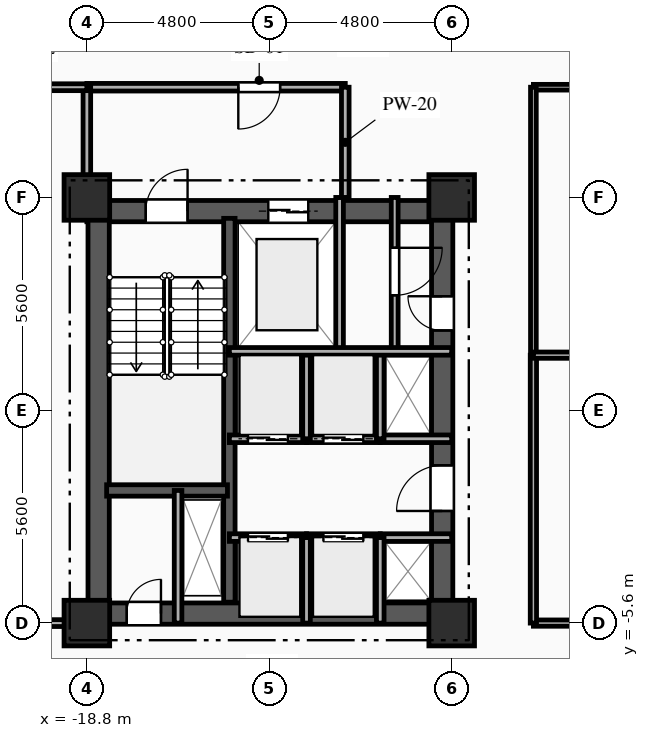
"""IFC4 building model, lengths in metres.
Left out: names, types, materials, properties, quantities, classifications, styles, units other than length and angle.
Written with IfcOpenShell. Run it as: python <this file> out.ifc"""

import sys

from ifc_helpers import new_model, si_unit, direction, frame, frame_2d, origin, origin_2d, place, context, subcontext, project, spatial, rectangle, extrude, element, fill, save


model = new_model("IFC4")
c1 = context("Model", 3, precision=1e-05, world=origin(), true_north=direction((0.0, 1.0)))
c2 = subcontext(c1, "Body", "Model", "MODEL_VIEW")
j1 = project(units=[si_unit("LENGTHUNIT", "METRE"), si_unit("PLANEANGLEUNIT", "RADIAN")], contexts=[c1])
p1 = place(None, origin())
s1 = spatial("IfcSite", under=j1, at=p1, CompositionType="ELEMENT")
p2 = place(p1, origin())
s2 = spatial("IfcBuilding", under=s1, at=p2, CompositionType="ELEMENT")
p3 = place(p2, frame((0.0, 0.0, 47.1)))
s3 = spatial("IfcBuildingStorey", under=s2, at=p3, CompositionType="ELEMENT", Elevation=47.1)
for number, where, z_axis, x_axis in (
    (1, (-18.8, -5.6, 0.0), (0.0, 0.0, 1.0), (1.0, 0.0, 0.0)),
    (2, (-18.8, 5.6, 0.0), (0.0, 0.0, 1.0), (1.0, 0.0, 0.0)),
    (3, (-9.2, -5.6, 0.0), (0.0, 0.0, 1.0), (1.0, 0.0, 0.0)),
    (4, (-9.2, 5.6, 0.0), (0.0, 0.0, 1.0), (1.0, 0.0, 0.0)),
):
    element("IfcColumn", number, at=place(p3, frame(where, z_axis=z_axis, x_axis=x_axis)), inside=s3, PredefinedType="COLUMN", context=c2, shape_type="SweptSolid", body=[
        extrude(rectangle(XDim=1.2, YDim=1.2, at=origin_2d()), origin(), (0.0, 0.0, 1.0), 3.35),
    ])
p4 = place(p3, frame((-18.8, 5.24, 0.0), z_axis=(0.0, 0.0, 1.0), x_axis=(1.0, 0.0, 0.0)))
e5 = element("IfcWall", 5, at=p4, inside=s3, PredefinedType="SHEAR", context=c2, shape_type="SweptSolid", body=[
    extrude(rectangle(XDim=9.6, YDim=0.56, at=frame_2d((4.8, 0.0))), origin(), (0.0, 0.0, 1.0), 3.035),
])
p5 = place(p4, frame((1.55, 0.0, 0.0)))
e6 = element("IfcOpeningElement", 6, at=p5, cuts=e5, PredefinedType="OPENING", context=c2, shape_type="SweptSolid", body=[
    extrude(rectangle(XDim=1.1, YDim=2.15, at=frame_2d((0.55, 1.075))), frame((0.0, 0.29, 0.0), z_axis=(0.0, -1.0, 0.0), x_axis=(1.0, 0.0, 0.0)), (0.0, 0.0, 1.0), 0.58),
])
p6 = place(p4, frame((4.775, 0.0, 0.0)))
e7 = element("IfcOpeningElement", 7, at=p6, cuts=e5, PredefinedType="OPENING", context=c2, shape_type="SweptSolid", body=[
    extrude(rectangle(XDim=1.05, YDim=2.1, at=frame_2d((0.525, 1.05))), frame((0.0, 0.29, 0.0), z_axis=(0.0, -1.0, 0.0), x_axis=(1.0, 0.0, 0.0)), (0.0, 0.0, 1.0), 0.58),
])
p7 = place(p3, frame((-18.8, -5.35, 0.0), z_axis=(0.0, 0.0, 1.0), x_axis=(1.0, 0.0, 0.0)))
e8 = element("IfcWall", 8, at=p7, inside=s3, PredefinedType="SHEAR", context=c2, shape_type="SweptSolid", body=[
    extrude(rectangle(XDim=9.6, YDim=0.56, at=frame_2d((4.8, 0.0))), origin(), (0.0, 0.0, 1.0), 3.035),
])
p8 = place(p7, frame((1.05, 0.0, 0.0)))
e9 = element("IfcOpeningElement", 9, at=p8, cuts=e8, PredefinedType="OPENING", context=c2, shape_type="SweptSolid", body=[
    extrude(rectangle(XDim=0.9, YDim=2.1, at=frame_2d((0.45, 1.05))), frame((0.0, 0.29, 0.0), z_axis=(0.0, -1.0, 0.0), x_axis=(1.0, 0.0, 0.0)), (0.0, 0.0, 1.0), 0.58),
])
p9 = place(p3, frame((-18.49, -5.05, 0.0), z_axis=(0.0, 0.0, 1.0), x_axis=(0.0, 1.0, 0.0)))
e10 = element("IfcWall", 10, at=p9, inside=s3, PredefinedType="SHEAR", context=c2, shape_type="SweptSolid", body=[
    extrude(rectangle(XDim=10.1, YDim=0.56, at=frame_2d((5.05, 0.0))), origin(), (0.0, 0.0, 1.0), 3.035),
])
p10 = place(p3, frame((-9.45, -5.05, 0.0), z_axis=(0.0, 0.0, 1.0), x_axis=(0.0, 1.0, 0.0)))
e11 = element("IfcWall", 11, at=p10, inside=s3, PredefinedType="SHEAR", context=c2, shape_type="SweptSolid", body=[
    extrude(rectangle(XDim=10.1, YDim=0.56, at=frame_2d((5.05, 0.0))), origin(), (0.0, 0.0, 1.0), 3.035),
])
p11 = place(p10, frame((7.15, 0.0, 0.0)))
e12 = element("IfcOpeningElement", 12, at=p11, cuts=e11, PredefinedType="OPENING", context=c2, shape_type="SweptSolid", body=[
    extrude(rectangle(XDim=0.9, YDim=2.1, at=frame_2d((0.45, 1.05))), frame((0.0, 0.29, 0.0), z_axis=(0.0, -1.0, 0.0), x_axis=(1.0, 0.0, 0.0)), (0.0, 0.0, 1.0), 0.58),
])
p12 = place(p10, frame((2.4, 0.0, 0.0)))
e13 = element("IfcOpeningElement", 13, at=p12, cuts=e11, PredefinedType="OPENING", context=c2, shape_type="SweptSolid", body=[
    extrude(rectangle(XDim=1.2, YDim=2.15, at=frame_2d((0.6, 1.075))), frame((0.0, 0.29, 0.0), z_axis=(0.0, -1.0, 0.0), x_axis=(1.0, 0.0, 0.0)), (0.0, 0.0, 1.0), 0.58),
])
p13 = place(p3, frame((-15.05, -5.05, 0.0), z_axis=(0.0, 0.0, 1.0), x_axis=(0.0, 1.0, 0.0)))
e14 = element("IfcWall", 14, at=p13, inside=s3, PredefinedType="SHEAR", context=c2, shape_type="SweptSolid", body=[
    extrude(rectangle(XDim=10.1, YDim=0.3, at=frame_2d((5.05, 0.0))), origin(), (0.0, 0.0, 1.0), 3.035),
])
p14 = place(p3, frame((-18.28, -2.11, 0.0), z_axis=(0.0, 0.0, 1.0), x_axis=(1.0, 0.0, 0.0)))
e15 = element("IfcWall", 15, at=p14, inside=s3, PredefinedType="SHEAR", context=c2, shape_type="SweptSolid", body=[
    extrude(rectangle(XDim=3.18, YDim=0.3, at=frame_2d((1.59, 0.0))), origin(), (0.0, 0.0, 1.0), 3.035),
])
p15 = place(p3, frame((-16.4, -5.6, 0.0), z_axis=(0.0, 0.0, 1.0), x_axis=(0.0, 1.0, 0.0)))
e16 = element("IfcWall", 16, at=p15, inside=s3, PredefinedType="PARTITIONING", context=c2, shape_type="SweptSolid", body=[
    extrude(rectangle(XDim=3.49, YDim=0.2, at=frame_2d((1.745, 0.0))), origin(), (0.0, 0.0, 1.0), 3.035),
])
p16 = place(p3, frame((-12.15, 1.55, 0.0), z_axis=(0.0, 0.0, 1.0), x_axis=(0.0, 1.0, 0.0)))
e17 = element("IfcWall", 17, at=p16, inside=s3, PredefinedType="PARTITIONING", context=c2, shape_type="SweptSolid", body=[
    extrude(rectangle(XDim=4.05, YDim=0.2, at=frame_2d((2.025, 0.0))), origin(), (0.0, 0.0, 1.0), 3.035),
])
p17 = place(p3, frame((-12.0, 8.5, 0.0), z_axis=(0.0, 0.0, 1.0), x_axis=(-1.0, 0.0, 0.0)))
e18 = element("IfcWall", 18, at=p17, inside=s3, PredefinedType="PARTITIONING", context=c2, shape_type="SweptSolid", body=[
    extrude(rectangle(XDim=6.8, YDim=0.2, at=frame_2d((3.4, 0.0))), origin(), (0.0, 0.0, 1.0), 3.035),
])
p18 = place(p17, frame((1.715, 0.0, 0.0)))
e19 = element("IfcOpeningElement", 19, at=p18, cuts=e18, PredefinedType="OPENING", context=c2, shape_type="SweptSolid", body=[
    extrude(rectangle(XDim=1.1, YDim=2.15, at=frame_2d((0.55, 1.075))), frame((0.0, 0.11, 0.0), z_axis=(0.0, -1.0, 0.0), x_axis=(1.0, 0.0, 0.0)), (0.0, 0.0, 1.0), 0.22),
])
p19 = place(p3, frame((-12.0, 5.6, 0.0), z_axis=(0.0, 0.0, 1.0), x_axis=(0.0, 1.0, 0.0)))
e20 = element("IfcWall", 20, at=p19, inside=s3, PredefinedType="PARTITIONING", context=c2, shape_type="SweptSolid", body=[
    extrude(rectangle(XDim=2.9, YDim=0.2, at=frame_2d((1.45, 0.0))), origin(), (0.0, 0.0, 1.0), 3.035),
])
p20 = place(p3, frame((-18.8, 8.5, 0.0), z_axis=(0.0, 0.0, 1.0), x_axis=(0.0, -1.0, 0.0)))
e21 = element("IfcWall", 21, at=p20, inside=s3, PredefinedType="PARTITIONING", context=c2, shape_type="SweptSolid", body=[
    extrude(rectangle(XDim=2.9, YDim=0.2, at=frame_2d((1.45, 0.0))), origin(), (0.0, 0.0, 1.0), 2.52),
])
p21 = place(p3, frame((-10.7, 5.6, 0.0), z_axis=(0.0, 0.0, 1.0), x_axis=(0.0, -1.0, 0.0)))
e22 = element("IfcWall", 22, at=p21, inside=s3, PredefinedType="PARTITIONING", context=c2, shape_type="SweptSolid", body=[
    extrude(rectangle(XDim=4.05, YDim=0.18, at=frame_2d((2.025, 0.0))), origin(), (0.0, 0.0, 1.0), 3.035),
])
p22 = place(p21, frame((1.325, 0.0, 0.0)))
e23 = element("IfcOpeningElement", 23, at=p22, cuts=e22, PredefinedType="OPENING", context=c2, shape_type="SweptSolid", body=[
    extrude(rectangle(XDim=1.25, YDim=2.2, at=frame_2d((0.625, 1.1))), frame((0.0, 0.1, 0.0), z_axis=(0.0, -1.0, 0.0), x_axis=(1.0, 0.0, 0.0)), (0.0, 0.0, 1.0), 0.2),
])
p23 = place(p3, frame((-15.05, -3.35, 0.0), z_axis=(0.0, 0.0, 1.0), x_axis=(1.0, 0.0, 0.0)))
e24 = element("IfcWall", 24, at=p23, inside=s3, PredefinedType="PARTITIONING", context=c2, shape_type="SweptSolid", body=[
    extrude(rectangle(XDim=2.03, YDim=0.2, at=frame_2d((1.015, 0.0))), origin(), (0.0, 0.0, 1.0), 3.035),
])
p24 = place(p23, frame((0.49, 0.0, 0.0)))
e25 = element("IfcOpeningElement", 25, at=p24, cuts=e24, PredefinedType="OPENING", context=c2, shape_type="SweptSolid", body=[
    extrude(rectangle(XDim=1.05, YDim=2.1, at=frame_2d((0.525, 1.05))), frame((0.0, 0.11, 0.0), z_axis=(0.0, -1.0, 0.0), x_axis=(1.0, 0.0, 0.0)), (0.0, 0.0, 1.0), 0.22),
])
p25 = place(p3, frame((-13.02, -3.35, 0.0), z_axis=(0.0, 0.0, 1.0), x_axis=(1.0, 0.0, 0.0)))
e26 = element("IfcWall", 26, at=p25, inside=s3, PredefinedType="PARTITIONING", context=c2, shape_type="SweptSolid", body=[
    extrude(rectangle(XDim=1.94, YDim=0.2, at=frame_2d((0.97, 0.0))), origin(), (0.0, 0.0, 1.0), 3.035),
])
p26 = place(p25, frame((0.445, 0.0, 0.0)))
e27 = element("IfcOpeningElement", 27, at=p26, cuts=e26, PredefinedType="OPENING", context=c2, shape_type="SweptSolid", body=[
    extrude(rectangle(XDim=1.05, YDim=2.1, at=frame_2d((0.525, 1.05))), frame((0.0, 0.11, 0.0), z_axis=(0.0, -1.0, 0.0), x_axis=(1.0, 0.0, 0.0)), (0.0, 0.0, 1.0), 0.22),
])
p27 = place(p3, frame((-11.08, -3.35, 0.0), z_axis=(0.0, 0.0, 1.0), x_axis=(1.0, 0.0, 0.0)))
e28 = element("IfcWall", 28, at=p27, inside=s3, PredefinedType="PARTITIONING", context=c2, shape_type="SweptSolid", body=[
    extrude(rectangle(XDim=1.88, YDim=0.2, at=frame_2d((0.94, 0.0))), origin(), (0.0, 0.0, 1.0), 2.75),
])
p28 = place(p3, frame((-13.02, -0.75, 0.0), z_axis=(0.0, 0.0, 1.0), x_axis=(-1.0, 0.0, 0.0)))
e29 = element("IfcWall", 29, at=p28, inside=s3, PredefinedType="PARTITIONING", context=c2, shape_type="SweptSolid", body=[
    extrude(rectangle(XDim=2.03, YDim=0.2, at=frame_2d((1.015, 0.0))), origin(), (0.0, 0.0, 1.0), 3.035),
])
p29 = place(p28, frame((0.49, 0.0, 0.0)))
e30 = element("IfcOpeningElement", 30, at=p29, cuts=e29, PredefinedType="OPENING", context=c2, shape_type="SweptSolid", body=[
    extrude(rectangle(XDim=1.05, YDim=2.1, at=frame_2d((0.525, 1.05))), frame((0.0, 0.11, 0.0), z_axis=(0.0, -1.0, 0.0), x_axis=(1.0, 0.0, 0.0)), (0.0, 0.0, 1.0), 0.22),
])
p30 = place(p3, frame((-11.08, -0.75, 0.0), z_axis=(0.0, 0.0, 1.0), x_axis=(-1.0, 0.0, 0.0)))
e31 = element("IfcWall", 31, at=p30, inside=s3, PredefinedType="PARTITIONING", context=c2, shape_type="SweptSolid", body=[
    extrude(rectangle(XDim=1.94, YDim=0.2, at=frame_2d((0.97, 0.0))), origin(), (0.0, 0.0, 1.0), 3.035),
])
p31 = place(p30, frame((0.445, 0.0, 0.0)))
e32 = element("IfcOpeningElement", 32, at=p31, cuts=e31, PredefinedType="OPENING", context=c2, shape_type="SweptSolid", body=[
    extrude(rectangle(XDim=1.05, YDim=2.1, at=frame_2d((0.525, 1.05))), frame((0.0, 0.11, 0.0), z_axis=(0.0, -1.0, 0.0), x_axis=(1.0, 0.0, 0.0)), (0.0, 0.0, 1.0), 0.22),
])
p32 = place(p3, frame((-9.2, -0.75, 0.0), z_axis=(0.0, 0.0, 1.0), x_axis=(-1.0, 0.0, 0.0)))
e33 = element("IfcWall", 33, at=p32, inside=s3, PredefinedType="PARTITIONING", context=c2, shape_type="SweptSolid", body=[
    extrude(rectangle(XDim=1.88, YDim=0.2, at=frame_2d((0.94, 0.0))), origin(), (0.0, 0.0, 1.0), 3.035),
])
for number, where, z_axis, x_axis in (
    (34, (-13.02, -5.6, 0.0), (0.0, 0.0, 1.0), (0.0, 1.0, 0.0)),
    (35, (-11.08, -5.6, 0.0), (0.0, 0.0, 1.0), (0.0, 1.0, 0.0)),
):
    element("IfcWall", number, at=place(p3, frame(where, z_axis=z_axis, x_axis=x_axis)), inside=s3, PredefinedType="PARTITIONING", context=c2, shape_type="SweptSolid", body=[
        extrude(rectangle(XDim=2.25, YDim=0.2, at=frame_2d((1.125, 0.0))), origin(), (0.0, 0.0, 1.0), 3.035),
    ])
for number, where, z_axis, x_axis in (
    (36, (-13.02, -0.75, 0.0), (0.0, 0.0, 1.0), (0.0, 1.0, 0.0)),
    (37, (-11.08, -0.75, 0.0), (0.0, 0.0, 1.0), (0.0, 1.0, 0.0)),
):
    element("IfcWall", number, at=place(p3, frame(where, z_axis=z_axis, x_axis=x_axis)), inside=s3, PredefinedType="PARTITIONING", context=c2, shape_type="SweptSolid", body=[
        extrude(rectangle(XDim=2.3, YDim=0.2, at=frame_2d((1.15, 0.0))), origin(), (0.0, 0.0, 1.0), 3.035),
    ])
p33 = place(p3, frame((-18.8, 8.5, 0.0), z_axis=(0.0, 0.0, 1.0), x_axis=(-1.0, 0.0, 0.0)))
e38 = element("IfcWall", 38, at=p33, inside=s3, PredefinedType="PARTITIONING", context=c2, shape_type="SweptSolid", body=[
    extrude(rectangle(XDim=2.65, YDim=0.18, at=frame_2d((1.325, 0.0))), origin(), (0.0, 0.0, 1.0), 3.035),
])
p34 = place(p33, frame((1.009, 0.0, 0.0)))
e39 = element("IfcOpeningElement", 39, at=p34, cuts=e38, PredefinedType="OPENING", context=c2, shape_type="SweptSolid", body=[
    extrude(rectangle(XDim=1.0, YDim=2.15, at=frame_2d((0.5, 1.075))), frame((0.0, 0.1, 0.0), z_axis=(0.0, -1.0, 0.0), x_axis=(1.0, 0.0, 0.0)), (0.0, 0.0, 1.0), 0.2),
])
p35 = place(p3, frame((0.0, 8.5, 0.0), z_axis=(0.0, 0.0, 1.0), x_axis=(-1.0, 0.0, 0.0)))
e40 = element("IfcWall", 40, at=p35, inside=s3, PredefinedType="PARTITIONING", context=c2, shape_type="SweptSolid", body=[
    extrude(rectangle(XDim=7.05, YDim=0.15, at=frame_2d((3.525, 0.0))), origin(), (0.0, 0.0, 1.0), 3.035),
])
p36 = place(p35, frame((1.185, 0.0, 0.0)))
e41 = element("IfcOpeningElement", 41, at=p36, cuts=e40, PredefinedType="OPENING", context=c2, shape_type="SweptSolid", body=[
    extrude(rectangle(XDim=1.05, YDim=2.15, at=frame_2d((0.525, 1.075))), frame((0.0, 0.085, 0.0), z_axis=(0.0, -1.0, 0.0), x_axis=(1.0, 0.0, 0.0)), (0.0, 0.0, 1.0), 0.17),
])
p37 = place(p3, frame((-21.45, -5.6, 0.0), z_axis=(0.0, 0.0, 1.0), x_axis=(1.0, 0.0, 0.0)))
e42 = element("IfcWall", 42, at=p37, inside=s3, PredefinedType="PARTITIONING", context=c2, shape_type="SweptSolid", body=[
    extrude(rectangle(XDim=2.65, YDim=0.18, at=frame_2d((1.325, 0.0))), origin(), (0.0, 0.0, 1.0), 3.035),
])
p38 = place(p3, frame((-7.05, -5.6, 0.0), z_axis=(0.0, 0.0, 1.0), x_axis=(1.0, 0.0, 0.0)))
e43 = element("IfcWall", 43, at=p38, inside=s3, PredefinedType="PARTITIONING", context=c2, shape_type="SweptSolid", body=[
    extrude(rectangle(XDim=7.05, YDim=0.165, at=frame_2d((3.525, 0.0))), origin(), (0.0, 0.0, 1.0), 2.52),
])
p39 = place(p38, frame((4.728, 0.0, 0.0)))
e44 = element("IfcOpeningElement", 44, at=p39, cuts=e43, PredefinedType="OPENING", context=c2, shape_type="SweptSolid", body=[
    extrude(rectangle(XDim=1.15, YDim=2.15, at=frame_2d((0.575, 1.075))), frame((0.0, 0.093, 0.0), z_axis=(0.0, -1.0, 0.0), x_axis=(1.0, 0.0, 0.0)), (0.0, 0.0, 1.0), 0.185),
])
p40 = place(p3, frame((-7.05, 1.45, 0.0), z_axis=(0.0, 0.0, 1.0), x_axis=(0.0, -1.0, 0.0)))
e45 = element("IfcWall", 45, at=p40, inside=s3, PredefinedType="PARTITIONING", context=c2, shape_type="SweptSolid", body=[
    extrude(rectangle(XDim=7.05, YDim=0.165, at=frame_2d((3.525, 0.0))), origin(), (0.0, 0.0, 1.0), 3.035),
])
p41 = place(p3, frame((-7.05, 8.5, 0.0), z_axis=(0.0, 0.0, 1.0), x_axis=(0.0, -1.0, 0.0)))
e46 = element("IfcWall", 46, at=p41, inside=s3, PredefinedType="PARTITIONING", context=c2, shape_type="SweptSolid", body=[
    extrude(rectangle(XDim=7.05, YDim=0.15, at=frame_2d((3.525, 0.0))), origin(), (0.0, 0.0, 1.0), 3.035),
])
p42 = place(p3, frame((-7.05, 1.45, 0.0), z_axis=(0.0, 0.0, 1.0), x_axis=(1.0, 0.0, 0.0)))
e47 = element("IfcWall", 47, at=p42, inside=s3, PredefinedType="PARTITIONING", context=c2, shape_type="SweptSolid", body=[
    extrude(rectangle(XDim=14.1, YDim=0.165, at=frame_2d((7.05, 0.0))), origin(), (0.0, 0.0, 1.0), 3.035),
])
p43 = place(p3, frame((-15.05, 1.55, 0.0), z_axis=(0.0, 0.0, 1.0), x_axis=(1.0, 0.0, 0.0)))
e48 = element("IfcWall", 48, at=p43, inside=s3, PredefinedType="PARTITIONING", context=c2, shape_type="SweptSolid", body=[
    extrude(rectangle(XDim=5.85, YDim=0.2, at=frame_2d((2.925, 0.0))), origin(), (0.0, 0.0, 1.0), 3.035),
])
p44 = place(p5, origin())
e49 = element("IfcDoor", 49, at=p44, inside=s3, OperationType="SINGLE_SWING_RIGHT", PredefinedType="DOOR", context=c2, shape_type="SweptSolid", body=[
    extrude(rectangle(XDim=1.1, YDim=2.15, at=frame_2d((0.55, 1.075))), frame((0.0, 0.025, 0.0), z_axis=(0.0, -1.0, 0.0), x_axis=(1.0, 0.0, 0.0)), (0.0, 0.0, 1.0), 0.05),
])
fill(e6, e49)
p45 = place(p6, origin())
e50 = element("IfcDoor", 50, at=p45, inside=s3, OperationType="DOUBLE_DOOR_SLIDING", PredefinedType="DOOR", context=c2, shape_type="SweptSolid", body=[
    extrude(rectangle(XDim=1.05, YDim=2.1, at=frame_2d((0.525, 1.05))), frame((0.0, 0.025, 0.0), z_axis=(0.0, -1.0, 0.0), x_axis=(1.0, 0.0, 0.0)), (0.0, 0.0, 1.0), 0.05),
])
fill(e7, e50)
p46 = place(p8, origin())
e51 = element("IfcDoor", 51, at=p46, inside=s3, OperationType="SINGLE_SWING_RIGHT", PredefinedType="DOOR", context=c2, shape_type="SweptSolid", body=[
    extrude(rectangle(XDim=0.9, YDim=2.1, at=frame_2d((0.45, 1.05))), frame((0.0, 0.025, 0.0), z_axis=(0.0, -1.0, 0.0), x_axis=(1.0, 0.0, 0.0)), (0.0, 0.0, 1.0), 0.05),
])
fill(e9, e51)
p47 = place(p18, origin())
e52 = element("IfcDoor", 52, at=p47, inside=s3, OperationType="SINGLE_SWING_RIGHT", PredefinedType="DOOR", context=c2, shape_type="SweptSolid", body=[
    extrude(rectangle(XDim=1.1, YDim=2.15, at=frame_2d((0.55, 1.075))), frame((0.0, 0.025, 0.0), z_axis=(0.0, -1.0, 0.0), x_axis=(1.0, 0.0, 0.0)), (0.0, 0.0, 1.0), 0.05),
])
fill(e19, e52)
p48 = place(p22, origin())
e53 = element("IfcDoor", 53, at=p48, inside=s3, OperationType="SINGLE_SWING_LEFT", PredefinedType="DOOR", context=c2, shape_type="SweptSolid", body=[
    extrude(rectangle(XDim=1.25, YDim=2.2, at=frame_2d((0.625, 1.1))), frame((0.0, 0.025, 0.0), z_axis=(0.0, -1.0, 0.0), x_axis=(1.0, 0.0, 0.0)), (0.0, 0.0, 1.0), 0.05),
])
fill(e23, e53)
p49 = place(p11, origin())
e54 = element("IfcDoor", 54, at=p49, inside=s3, OperationType="SINGLE_SWING_RIGHT", PredefinedType="DOOR", context=c2, shape_type="SweptSolid", body=[
    extrude(rectangle(XDim=0.9, YDim=2.1, at=frame_2d((0.45, 1.05))), frame((0.0, 0.025, 0.0), z_axis=(0.0, -1.0, 0.0), x_axis=(1.0, 0.0, 0.0)), (0.0, 0.0, 1.0), 0.05),
])
fill(e12, e54)
p50 = place(p24, origin())
e55 = element("IfcDoor", 55, at=p50, inside=s3, OperationType="DOUBLE_DOOR_SLIDING", PredefinedType="DOOR", context=c2, shape_type="SweptSolid", body=[
    extrude(rectangle(XDim=1.05, YDim=2.1, at=frame_2d((0.525, 1.05))), frame((0.0, 0.025, 0.0), z_axis=(0.0, -1.0, 0.0), x_axis=(1.0, 0.0, 0.0)), (0.0, 0.0, 1.0), 0.05),
])
fill(e25, e55)
p51 = place(p26, origin())
e56 = element("IfcDoor", 56, at=p51, inside=s3, OperationType="DOUBLE_DOOR_SLIDING", PredefinedType="DOOR", context=c2, shape_type="SweptSolid", body=[
    extrude(rectangle(XDim=1.05, YDim=2.1, at=frame_2d((0.525, 1.05))), frame((0.0, 0.025, 0.0), z_axis=(0.0, -1.0, 0.0), x_axis=(1.0, 0.0, 0.0)), (0.0, 0.0, 1.0), 0.05),
])
fill(e27, e56)
p52 = place(p29, origin())
e57 = element("IfcDoor", 57, at=p52, inside=s3, OperationType="DOUBLE_DOOR_SLIDING", PredefinedType="DOOR", context=c2, shape_type="SweptSolid", body=[
    extrude(rectangle(XDim=1.05, YDim=2.1, at=frame_2d((0.525, 1.05))), frame((0.0, 0.025, 0.0), z_axis=(0.0, -1.0, 0.0), x_axis=(1.0, 0.0, 0.0)), (0.0, 0.0, 1.0), 0.05),
])
fill(e30, e57)
p53 = place(p31, origin())
e58 = element("IfcDoor", 58, at=p53, inside=s3, OperationType="DOUBLE_DOOR_SLIDING", PredefinedType="DOOR", context=c2, shape_type="SweptSolid", body=[
    extrude(rectangle(XDim=1.05, YDim=2.1, at=frame_2d((0.525, 1.05))), frame((0.0, 0.025, 0.0), z_axis=(0.0, -1.0, 0.0), x_axis=(1.0, 0.0, 0.0)), (0.0, 0.0, 1.0), 0.05),
])
fill(e32, e58)
p54 = place(p12, origin())
e59 = element("IfcDoor", 59, at=p54, inside=s3, OperationType="SINGLE_SWING_LEFT", PredefinedType="DOOR", context=c2, shape_type="SweptSolid", body=[
    extrude(rectangle(XDim=1.2, YDim=2.15, at=frame_2d((0.6, 1.075))), frame((0.0, 0.025, 0.0), z_axis=(0.0, -1.0, 0.0), x_axis=(1.0, 0.0, 0.0)), (0.0, 0.0, 1.0), 0.05),
])
fill(e13, e59)
save(model, sys.argv[1])
